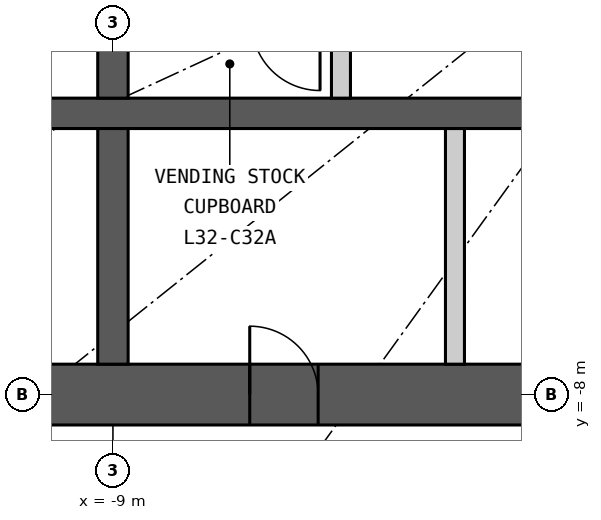
"""IFC4 building model, lengths in metres.
Left out: names, types, materials, properties, quantities, classifications, styles, units other than length and angle.
Written with IfcOpenShell. Run it as: python <this file> out.ifc"""

import sys

from ifc_helpers import new_model, si_unit, direction, frame, frame_2d, origin, place, context, subcontext, project, spatial, rectangle, extrude, element, fill, save


model = new_model("IFC4")
c1 = context("Model", 3, precision=1e-05, world=origin(), true_north=direction((0.0, 1.0)))
c2 = subcontext(c1, "Body", "Model", "MODEL_VIEW")
j1 = project(units=[si_unit("LENGTHUNIT", "METRE"), si_unit("PLANEANGLEUNIT", "RADIAN")], contexts=[c1])
p1 = place(None, origin())
s1 = spatial("IfcSite", under=j1, at=p1, CompositionType="ELEMENT")
p2 = place(p1, origin())
s2 = spatial("IfcBuilding", under=s1, at=p2, CompositionType="ELEMENT")
p3 = place(p2, frame((0.0, 0.0, 125.4)))
s3 = spatial("IfcBuildingStorey", under=s2, at=p3, CompositionType="ELEMENT", Elevation=125.4)
p4 = place(p3, frame((12.4, -8.0, 0.0), z_axis=(0.0, 0.0, 1.0), x_axis=(-1.0, 0.0, 0.0)))
e1 = element("IfcWall", 1, at=p4, inside=s3, PredefinedType="SHEAR", context=c2, shape_type="SweptSolid", body=[
    extrude(rectangle(XDim=24.8, YDim=0.8, at=frame_2d((12.4, 0.0))), origin(), (0.0, 0.0, 1.0), 3.3),
])
p5 = place(p4, frame((11.1, 0.0, 0.0)))
e2 = element("IfcOpeningElement", 2, at=p5, cuts=e1, PredefinedType="OPENING", context=c2, shape_type="SweptSolid", body=[
    extrude(rectangle(XDim=1.2, YDim=2.2, at=frame_2d((0.6, 1.1))), frame((0.0, 0.41, 0.0), z_axis=(0.0, -1.0, 0.0), x_axis=(1.0, 0.0, 0.0)), (0.0, 0.0, 1.0), 0.82),
])
p6 = place(p4, frame((18.7, 0.0, 0.0)))
e3 = element("IfcOpeningElement", 3, at=p6, cuts=e1, PredefinedType="OPENING", context=c2, shape_type="SweptSolid", body=[
    extrude(rectangle(XDim=0.9, YDim=2.2, at=frame_2d((0.45, 1.1))), frame((0.0, 0.41, 0.0), z_axis=(0.0, -1.0, 0.0), x_axis=(1.0, 0.0, 0.0)), (0.0, 0.0, 1.0), 0.82),
])
p7 = place(p3, frame((-11.6, -4.3, 0.0), z_axis=(0.0, 0.0, 1.0), x_axis=(1.0, 0.0, 0.0)))
e4 = element("IfcWall", 4, at=p7, inside=s3, PredefinedType="SHEAR", context=c2, shape_type="SweptSolid", body=[
    extrude(rectangle(XDim=23.2, YDim=0.4, at=frame_2d((11.6, 0.0))), origin(), (0.0, 0.0, 1.0), 3.3),
])
p8 = place(p3, frame((-9.0, -4.1, 0.0), z_axis=(0.0, 0.0, 1.0), x_axis=(0.0, 1.0, 0.0)))
e5 = element("IfcWall", 5, at=p8, inside=s3, PredefinedType="SHEAR", context=c2, shape_type="SweptSolid", body=[
    extrude(rectangle(XDim=2.35, YDim=0.4, at=frame_2d((1.175, 0.0))), origin(), (0.0, 0.0, 1.0), 3.3),
])
p9 = place(p3, frame((-9.0, -7.6, 0.0), z_axis=(0.0, 0.0, 1.0), x_axis=(0.0, 1.0, 0.0)))
e6 = element("IfcWall", 6, at=p9, inside=s3, PredefinedType="SHEAR", context=c2, shape_type="SweptSolid", body=[
    extrude(rectangle(XDim=3.1, YDim=0.4, at=frame_2d((1.55, 0.0))), origin(), (0.0, 0.0, 1.0), 3.3),
])
p10 = place(p3, frame((-4.5, -7.6, 0.0), z_axis=(0.0, 0.0, 1.0), x_axis=(0.0, 1.0, 0.0)))
e7 = element("IfcWall", 7, at=p10, inside=s3, PredefinedType="PARTITIONING", context=c2, shape_type="SweptSolid", body=[
    extrude(rectangle(XDim=3.1, YDim=0.25, at=frame_2d((1.55, 0.0))), origin(), (0.0, 0.0, 1.0), 3.3),
])
p11 = place(p3, frame((-6.0, -4.1, 0.0), z_axis=(0.0, 0.0, 1.0), x_axis=(0.0, 1.0, 0.0)))
e8 = element("IfcWall", 8, at=p11, inside=s3, PredefinedType="PARTITIONING", context=c2, shape_type="SweptSolid", body=[
    extrude(rectangle(XDim=2.35, YDim=0.25, at=frame_2d((1.175, 0.0))), origin(), (0.0, 0.0, 1.0), 3.3),
])
p12 = place(p6, origin())
e9 = element("IfcDoor", 9, at=p12, inside=s3, OperationType="SINGLE_SWING_RIGHT", PredefinedType="DOOR", context=c2, shape_type="SweptSolid", body=[
    extrude(rectangle(XDim=0.9, YDim=2.2, at=frame_2d((0.45, 1.1))), frame((0.0, 0.025, 0.0), z_axis=(0.0, -1.0, 0.0), x_axis=(1.0, 0.0, 0.0)), (0.0, 0.0, 1.0), 0.05),
])
fill(e3, e9)
save(model, sys.argv[1])
